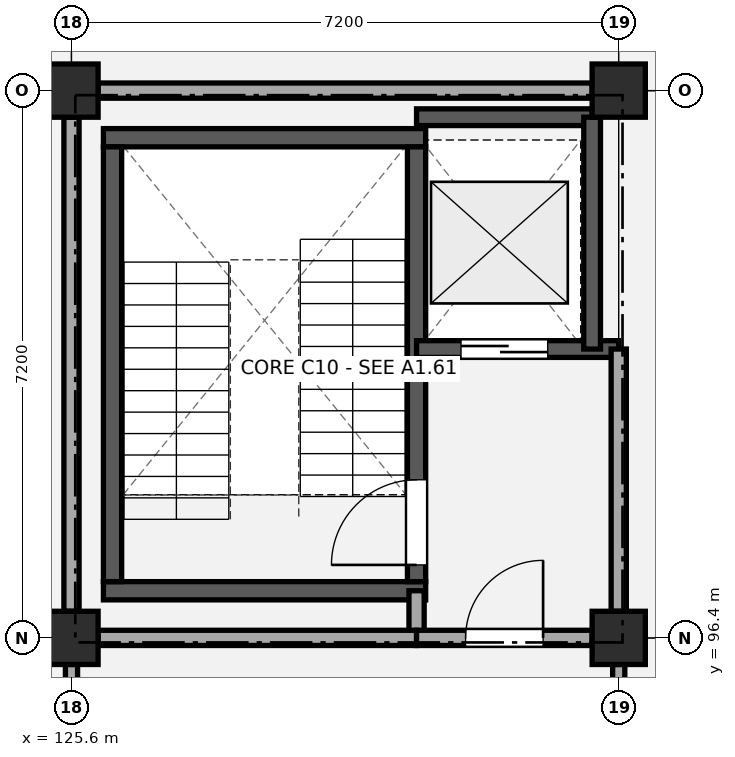
"""IFC4 building model, lengths in metres.
Left out: names, types, materials, properties, quantities, classifications, styles, units other than length and angle.
Written with IfcOpenShell. Run it as: python <this file> out.ifc"""

import sys

from ifc_helpers import new_model, si_unit, direction, frame, frame_2d, origin, origin_2d, place, context, subcontext, project, spatial, rectangle, extrude, element, fill, save


model = new_model("IFC4")
c1 = context("Model", 3, precision=1e-05, world=origin(), true_north=direction((0.0, 1.0)))
c2 = subcontext(c1, "Body", "Model", "MODEL_VIEW")
j1 = project(units=[si_unit("LENGTHUNIT", "METRE"), si_unit("PLANEANGLEUNIT", "RADIAN")], contexts=[c1])
p1 = place(None, origin())
s1 = spatial("IfcSite", under=j1, at=p1, CompositionType="ELEMENT")
p2 = place(p1, origin())
s2 = spatial("IfcBuilding", under=s1, at=p2, CompositionType="ELEMENT")
p3 = place(p2, frame((0.0, 0.0, 9.18)))
s3 = spatial("IfcBuildingStorey", under=s2, at=p3, CompositionType="ELEMENT", Elevation=9.18)
for number, where, z_axis, x_axis in (
    (1, (125.6, 96.4, 0.0), (0.0, 0.0, 1.0), (1.0, 0.0, 0.0)),
    (2, (125.6, 103.6, 0.0), (0.0, 0.0, 1.0), (1.0, 0.0, 0.0)),
    (3, (132.8, 96.4, 0.0), (0.0, 0.0, 1.0), (1.0, 0.0, 0.0)),
    (4, (132.8, 103.6, 0.0), (0.0, 0.0, 1.0), (1.0, 0.0, 0.0)),
):
    element("IfcColumn", number, at=place(p3, frame(where, z_axis=z_axis, x_axis=x_axis)), inside=s3, PredefinedType="COLUMN", context=c2, shape_type="SweptSolid", body=[
        extrude(rectangle(XDim=0.7, YDim=0.7, at=origin_2d()), origin(), (0.0, 0.0, 1.0), 4.32),
    ])
for number, where, z_axis, x_axis in (
    (5, (126.02, 97.02, 0.0), (0.0, 0.0, 1.0), (1.0, 0.0, 0.0)),
    (6, (126.02, 102.98, 0.0), (0.0, 0.0, 1.0), (1.0, 0.0, 0.0)),
):
    element("IfcWall", number, at=place(p3, frame(where, z_axis=z_axis, x_axis=x_axis)), inside=s3, PredefinedType="SHEAR", context=c2, shape_type="SweptSolid", body=[
        extrude(rectangle(XDim=4.24, YDim=0.24, at=frame_2d((2.12, 0.0))), origin(), (0.0, 0.0, 1.0), 4.02),
    ])
p4 = place(p3, frame((126.14, 97.14, 0.0), z_axis=(0.0, 0.0, 1.0), x_axis=(0.0, 1.0, 0.0)))
e7 = element("IfcWall", 7, at=p4, inside=s3, PredefinedType="SHEAR", context=c2, shape_type="SweptSolid", body=[
    extrude(rectangle(XDim=5.72, YDim=0.24, at=frame_2d((2.86, 0.0))), origin(), (0.0, 0.0, 1.0), 4.02),
])
p5 = place(p3, frame((130.14, 97.14, 0.0), z_axis=(0.0, 0.0, 1.0), x_axis=(0.0, 1.0, 0.0)))
e8 = element("IfcWall", 8, at=p5, inside=s3, PredefinedType="SHEAR", context=c2, shape_type="SweptSolid", body=[
    extrude(rectangle(XDim=5.72, YDim=0.24, at=frame_2d((2.86, 0.0))), origin(), (0.0, 0.0, 1.0), 4.02),
])
p6 = place(p5, frame((0.22, 0.0, 0.0)))
e9 = element("IfcOpeningElement", 9, at=p6, cuts=e8, PredefinedType="OPENING", context=c2, shape_type="SweptSolid", body=[
    extrude(rectangle(XDim=1.12, YDim=2.15, at=frame_2d((0.56, 1.075))), frame((0.0, 0.13, 0.0), z_axis=(0.0, -1.0, 0.0), x_axis=(1.0, 0.0, 0.0)), (0.0, 0.0, 1.0), 0.26),
])
p7 = place(p3, frame((130.14, 100.2, 0.0), z_axis=(0.0, 0.0, 1.0), x_axis=(1.0, 0.0, 0.0)))
e10 = element("IfcWall", 10, at=p7, inside=s3, PredefinedType="SHEAR", context=c2, shape_type="SweptSolid", body=[
    extrude(rectangle(XDim=2.66, YDim=0.22, at=frame_2d((1.33, 0.0))), origin(), (0.0, 0.0, 1.0), 4.02),
])
p8 = place(p7, frame((0.585, 0.0, 0.0)))
e11 = element("IfcOpeningElement", 11, at=p8, cuts=e10, PredefinedType="OPENING", context=c2, shape_type="SweptSolid", body=[
    extrude(rectangle(XDim=1.14, YDim=2.15, at=frame_2d((0.57, 1.075))), frame((0.0, 0.12, 0.0), z_axis=(0.0, -1.0, 0.0), x_axis=(1.0, 0.0, 0.0)), (0.0, 0.0, 1.0), 0.24),
])
p9 = place(p3, frame((130.14, 103.25, 0.0), z_axis=(0.0, 0.0, 1.0), x_axis=(1.0, 0.0, 0.0)))
e12 = element("IfcWall", 12, at=p9, inside=s3, PredefinedType="SHEAR", context=c2, shape_type="SweptSolid", body=[
    extrude(rectangle(XDim=2.31, YDim=0.22, at=frame_2d((1.155, 0.0))), origin(), (0.0, 0.0, 1.0), 4.02),
])
p10 = place(p3, frame((132.45, 100.2, 0.0), z_axis=(0.0, 0.0, 1.0), x_axis=(0.0, 1.0, 0.0)))
e13 = element("IfcWall", 13, at=p10, inside=s3, PredefinedType="SHEAR", context=c2, shape_type="SweptSolid", body=[
    extrude(rectangle(XDim=3.05, YDim=0.22, at=frame_2d((1.525, 0.0))), origin(), (0.0, 0.0, 1.0), 4.02),
])
p11 = place(p3, frame((130.14, 96.4, 0.0), z_axis=(0.0, 0.0, 1.0), x_axis=(0.0, 1.0, 0.0)))
e14 = element("IfcWall", 14, at=p11, inside=s3, PredefinedType="PARTITIONING", context=c2, shape_type="SweptSolid", body=[
    extrude(rectangle(XDim=0.62, YDim=0.2, at=frame_2d((0.31, 0.0))), origin(), (0.0, 0.0, 1.0), 3.36),
])
p12 = place(p3, frame((125.6, 96.75, 0.0), z_axis=(0.0, 0.0, 1.0), x_axis=(0.0, 1.0, 0.0)))
e15 = element("IfcWall", 15, at=p12, inside=s3, PredefinedType="PARTITIONING", context=c2, shape_type="SweptSolid", body=[
    extrude(rectangle(XDim=6.5, YDim=0.2, at=frame_2d((3.25, 0.0))), origin(), (0.0, 0.0, 1.0), 3.41),
])
p13 = place(p3, frame((132.8, 96.75, 0.0), z_axis=(0.0, 0.0, 1.0), x_axis=(0.0, 1.0, 0.0)))
e16 = element("IfcWall", 16, at=p13, inside=s3, PredefinedType="PARTITIONING", context=c2, shape_type="SweptSolid", body=[
    extrude(rectangle(XDim=3.45, YDim=0.2, at=frame_2d((1.725, 0.0))), origin(), (0.0, 0.0, 1.0), 3.41),
])
p14 = place(p3, frame((125.95, 96.4, 0.0), z_axis=(0.0, 0.0, 1.0), x_axis=(1.0, 0.0, 0.0)))
e17 = element("IfcWall", 17, at=p14, inside=s3, PredefinedType="PARTITIONING", context=c2, shape_type="SweptSolid", body=[
    extrude(rectangle(XDim=4.19, YDim=0.2, at=frame_2d((2.095, 0.0))), origin(), (0.0, 0.0, 1.0), 3.36),
])
p15 = place(p3, frame((130.14, 96.4, 0.0), z_axis=(0.0, 0.0, 1.0), x_axis=(1.0, 0.0, 0.0)))
e18 = element("IfcWall", 18, at=p15, inside=s3, PredefinedType="PARTITIONING", context=c2, shape_type="SweptSolid", body=[
    extrude(rectangle(XDim=2.31, YDim=0.2, at=frame_2d((1.155, 0.0))), origin(), (0.0, 0.0, 1.0), 3.36),
])
p16 = place(p15, frame((0.645, 0.0, 0.0)))
e19 = element("IfcOpeningElement", 19, at=p16, cuts=e18, PredefinedType="OPENING", context=c2, shape_type="SweptSolid", body=[
    extrude(rectangle(XDim=1.02, YDim=2.15, at=frame_2d((0.51, 1.075))), frame((0.0, 0.11, 0.0), z_axis=(0.0, -1.0, 0.0), x_axis=(1.0, 0.0, 0.0)), (0.0, 0.0, 1.0), 0.22),
])
p17 = place(p3, frame((125.95, 103.6, 0.0), z_axis=(0.0, 0.0, 1.0), x_axis=(1.0, 0.0, 0.0)))
e20 = element("IfcWall", 20, at=p17, inside=s3, PredefinedType="PARTITIONING", context=c2, shape_type="SweptSolid", body=[
    extrude(rectangle(XDim=6.5, YDim=0.2, at=frame_2d((3.25, 0.0))), origin(), (0.0, 0.0, 1.0), 3.41),
])
for number, where, z_axis, x_axis in (
    (21, (125.6, 89.55, 0.0), (0.0, 0.0, 1.0), (0.0, 1.0, 0.0)),
    (22, (132.8, 89.55, 0.0), (0.0, 0.0, 1.0), (0.0, 1.0, 0.0)),
):
    element("IfcWall", number, at=place(p3, frame(where, z_axis=z_axis, x_axis=x_axis)), inside=s3, PredefinedType="PARTITIONING", context=c2, shape_type="SweptSolid", body=[
        extrude(rectangle(XDim=6.5, YDim=0.16, at=frame_2d((3.25, 0.0))), origin(), (0.0, 0.0, 1.0), 3.36),
    ])
p18 = place(p6, origin())
e23 = element("IfcDoor", 23, at=p18, inside=s3, OperationType="SINGLE_SWING_LEFT", PredefinedType="DOOR", context=c2, shape_type="SweptSolid", body=[
    extrude(rectangle(XDim=1.12, YDim=2.15, at=frame_2d((0.56, 1.075))), frame((0.0, 0.025, 0.0), z_axis=(0.0, -1.0, 0.0), x_axis=(1.0, 0.0, 0.0)), (0.0, 0.0, 1.0), 0.05),
])
fill(e9, e23)
p19 = place(p8, origin())
e24 = element("IfcDoor", 24, at=p19, inside=s3, OperationType="SLIDING_TO_LEFT", PredefinedType="DOOR", context=c2, shape_type="SweptSolid", body=[
    extrude(rectangle(XDim=1.14, YDim=2.15, at=frame_2d((0.57, 1.075))), frame((0.0, 0.025, 0.0), z_axis=(0.0, -1.0, 0.0), x_axis=(1.0, 0.0, 0.0)), (0.0, 0.0, 1.0), 0.05),
])
fill(e11, e24)
p20 = place(p16, origin())
e25 = element("IfcDoor", 25, at=p20, inside=s3, OperationType="SINGLE_SWING_RIGHT", PredefinedType="DOOR", context=c2, shape_type="SweptSolid", body=[
    extrude(rectangle(XDim=1.02, YDim=2.15, at=frame_2d((0.51, 1.075))), frame((0.0, 0.025, 0.0), z_axis=(0.0, -1.0, 0.0), x_axis=(1.0, 0.0, 0.0)), (0.0, 0.0, 1.0), 0.05),
])
fill(e19, e25)
save(model, sys.argv[1])
